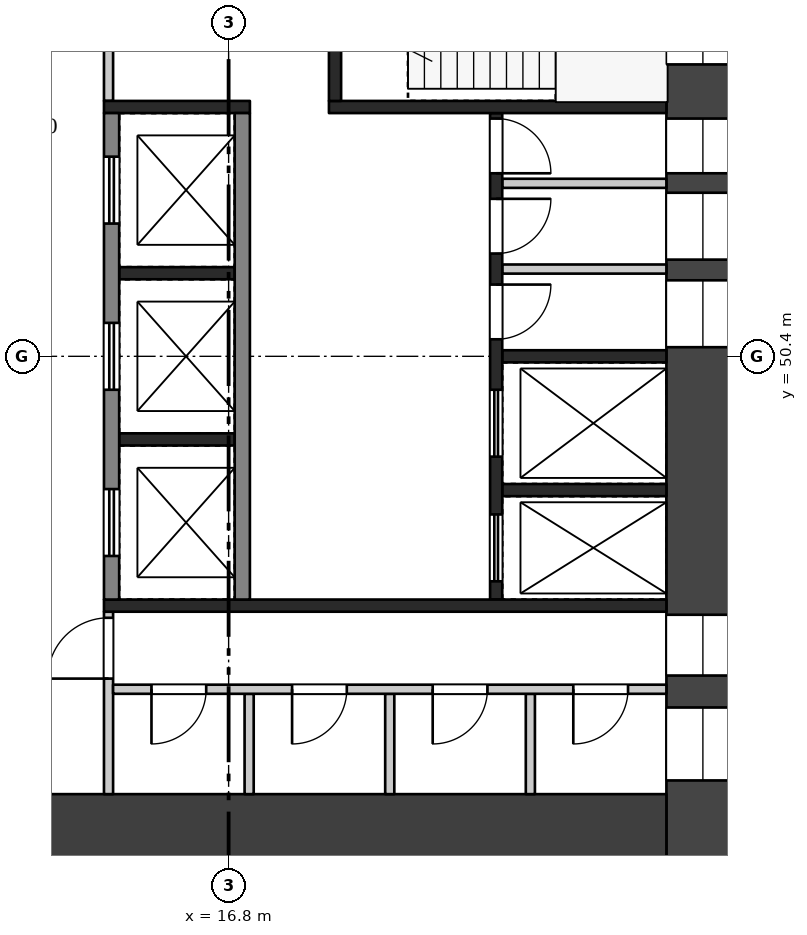
"""IFC4 building model, lengths in metres.
Left out: names, types, materials, properties, quantities, classifications, styles, units other than length and angle.
Written with IfcOpenShell. Run it as: python <this file> out.ifc"""

import sys

from ifc_helpers import new_model, si_unit, direction, frame, frame_2d, origin, place, context, subcontext, project, spatial, rectangle, extrude, element, fill, save


model = new_model("IFC4")
c1 = context("Model", 3, precision=1e-05, world=origin(), true_north=direction((0.0, 1.0)))
c2 = subcontext(c1, "Body", "Model", "MODEL_VIEW")
j1 = project(units=[si_unit("LENGTHUNIT", "METRE"), si_unit("PLANEANGLEUNIT", "RADIAN")], contexts=[c1])
p1 = place(None, origin())
s1 = spatial("IfcSite", under=j1, at=p1, CompositionType="ELEMENT")
p2 = place(p1, origin())
s2 = spatial("IfcBuilding", under=s1, at=p2, CompositionType="ELEMENT")
p3 = place(p2, frame((0.0, 0.0, 158.2)))
s3 = spatial("IfcBuildingStorey", under=s2, at=p3, CompositionType="ELEMENT", Elevation=158.2)
p4 = place(p3, frame((24.6, 58.8, 0.0), z_axis=(0.0, 0.0, 1.0), x_axis=(0.0, -1.0, 0.0)))
e1 = element("IfcWall", 1, at=p4, inside=s3, PredefinedType="SHEAR", context=c2, shape_type="SweptSolid", body=[
    extrude(rectangle(XDim=16.8, YDim=1.2, at=frame_2d((8.4, 0.0))), origin(), (0.0, 0.0, 1.0), 3.22),
])
p5 = place(p4, frame((1.8, 0.0, 0.5)))
e2 = element("IfcOpeningElement", 2, at=p5, cuts=e1, PredefinedType="OPENING", context=c2, shape_type="SweptSolid", body=[
    extrude(rectangle(XDim=1.8, YDim=2.4, at=frame_2d((0.9, 1.2))), frame((0.0, 0.61, 0.0), z_axis=(0.0, -1.0, 0.0), x_axis=(1.0, 0.0, 0.0)), (0.0, 0.0, 1.0), 1.22),
])
p6 = place(p4, frame((4.49, 0.0, 1.6)))
e3 = element("IfcOpeningElement", 3, at=p6, cuts=e1, PredefinedType="OPENING", context=c2, shape_type="SweptSolid", body=[
    extrude(rectangle(XDim=0.9, YDim=1.2, at=frame_2d((0.45, 0.6))), frame((0.0, 0.61, 0.0), z_axis=(0.0, -1.0, 0.0), x_axis=(1.0, 0.0, 0.0)), (0.0, 0.0, 1.0), 1.22),
])
p7 = place(p4, frame((5.71, 0.0, 1.6)))
e4 = element("IfcOpeningElement", 4, at=p7, cuts=e1, PredefinedType="OPENING", context=c2, shape_type="SweptSolid", body=[
    extrude(rectangle(XDim=1.1, YDim=1.2, at=frame_2d((0.55, 0.6))), frame((0.0, 0.61, 0.0), z_axis=(0.0, -1.0, 0.0), x_axis=(1.0, 0.0, 0.0)), (0.0, 0.0, 1.0), 1.22),
])
p8 = place(p4, frame((7.15, 0.0, 1.6)))
e5 = element("IfcOpeningElement", 5, at=p8, cuts=e1, PredefinedType="OPENING", context=c2, shape_type="SweptSolid", body=[
    extrude(rectangle(XDim=1.1, YDim=1.2, at=frame_2d((0.55, 0.6))), frame((0.0, 0.61, 0.0), z_axis=(0.0, -1.0, 0.0), x_axis=(1.0, 0.0, 0.0)), (0.0, 0.0, 1.0), 1.22),
])
p9 = place(p4, frame((12.65, 0.0, 0.6)))
e6 = element("IfcOpeningElement", 6, at=p9, cuts=e1, PredefinedType="OPENING", context=c2, shape_type="SweptSolid", body=[
    extrude(rectangle(XDim=1.0, YDim=2.1, at=frame_2d((0.5, 1.05))), frame((0.0, 0.61, 0.0), z_axis=(0.0, -1.0, 0.0), x_axis=(1.0, 0.0, 0.0)), (0.0, 0.0, 1.0), 1.22),
])
p10 = place(p4, frame((14.175, 0.0, 1.6)))
e7 = element("IfcOpeningElement", 7, at=p10, cuts=e1, PredefinedType="OPENING", context=c2, shape_type="SweptSolid", body=[
    extrude(rectangle(XDim=1.2, YDim=1.2, at=frame_2d((0.6, 0.6))), frame((0.0, 0.61, 0.0), z_axis=(0.0, -1.0, 0.0), x_axis=(1.0, 0.0, 0.0)), (0.0, 0.0, 1.0), 1.22),
])
p11 = place(p3, frame((9.6, 42.6, 0.0), z_axis=(0.0, 0.0, 1.0), x_axis=(1.0, 0.0, 0.0)))
e8 = element("IfcWall", 8, at=p11, inside=s3, PredefinedType="SHEAR", context=c2, shape_type="SweptSolid", body=[
    extrude(rectangle(XDim=14.4, YDim=1.2, at=frame_2d((7.2, 0.0))), origin(), (0.0, 0.0, 1.0), 3.22),
])
p12 = place(p11, frame((2.1, 0.0, 0.0)))
e9 = element("IfcOpeningElement", 9, at=p12, cuts=e8, PredefinedType="OPENING", context=c2, shape_type="SweptSolid", body=[
    extrude(rectangle(XDim=1.8, YDim=2.1, at=frame_2d((0.9, 1.05))), frame((0.0, 0.61, 0.0), z_axis=(0.0, -1.0, 0.0), x_axis=(1.0, 0.0, 0.0)), (0.0, 0.0, 1.0), 1.22),
])
for number, where, z_axis, x_axis in (
    (10, (15.0, 51.767, 0.0), (0.0, 0.0, 1.0), (1.0, 0.0, 0.0)),
    (11, (15.0, 49.033, 0.0), (0.0, 0.0, 1.0), (1.0, 0.0, 0.0)),
):
    element("IfcWall", number, at=place(p3, frame(where, z_axis=z_axis, x_axis=x_axis)), inside=s3, PredefinedType="SHEAR", context=c2, shape_type="SweptSolid", body=[
        extrude(rectangle(XDim=1.9, YDim=0.2, at=frame_2d((0.95, 0.0))), origin(), (0.0, 0.0, 1.0), 3.22),
    ])
p13 = place(p3, frame((14.875, 54.4, 0.0), z_axis=(0.0, 0.0, 1.0), x_axis=(0.0, -1.0, 0.0)))
e12 = element("IfcWall", 12, at=p13, inside=s3, PredefinedType="SHEAR", context=c2, shape_type="SweptSolid", body=[
    extrude(rectangle(XDim=8.0, YDim=0.25, at=frame_2d((4.0, 0.0))), origin(), (0.0, 0.0, 1.0), 3.22),
])
p14 = place(p13, frame((0.717, 0.0, 0.0)))
e13 = element("IfcOpeningElement", 13, at=p14, cuts=e12, PredefinedType="OPENING", context=c2, shape_type="SweptSolid", body=[
    extrude(rectangle(XDim=1.1, YDim=2.1, at=frame_2d((0.55, 1.05))), frame((0.0, 0.135, 0.0), z_axis=(0.0, -1.0, 0.0), x_axis=(1.0, 0.0, 0.0)), (0.0, 0.0, 1.0), 0.27),
])
p15 = place(p13, frame((3.45, 0.0, 0.0)))
e14 = element("IfcOpeningElement", 14, at=p15, cuts=e12, PredefinedType="OPENING", context=c2, shape_type="SweptSolid", body=[
    extrude(rectangle(XDim=1.1, YDim=2.1, at=frame_2d((0.55, 1.05))), frame((0.0, 0.135, 0.0), z_axis=(0.0, -1.0, 0.0), x_axis=(1.0, 0.0, 0.0)), (0.0, 0.0, 1.0), 0.27),
])
p16 = place(p13, frame((6.183, 0.0, 0.0)))
e15 = element("IfcOpeningElement", 15, at=p16, cuts=e12, PredefinedType="OPENING", context=c2, shape_type="SweptSolid", body=[
    extrude(rectangle(XDim=1.1, YDim=2.1, at=frame_2d((0.55, 1.05))), frame((0.0, 0.135, 0.0), z_axis=(0.0, -1.0, 0.0), x_axis=(1.0, 0.0, 0.0)), (0.0, 0.0, 1.0), 0.27),
])
p17 = place(p3, frame((17.025, 54.4, 0.0), z_axis=(0.0, 0.0, 1.0), x_axis=(0.0, -1.0, 0.0)))
e16 = element("IfcWall", 16, at=p17, inside=s3, PredefinedType="SHEAR", context=c2, shape_type="SweptSolid", body=[
    extrude(rectangle(XDim=8.0, YDim=0.25, at=frame_2d((4.0, 0.0))), origin(), (0.0, 0.0, 1.0), 3.22),
])
for number, where, z_axis, x_axis in (
    (17, (21.3, 50.4, 0.0), (0.0, 0.0, 1.0), (1.0, 0.0, 0.0)),
    (18, (21.3, 48.2, 0.0), (0.0, 0.0, 1.0), (1.0, 0.0, 0.0)),
):
    element("IfcWall", number, at=place(p3, frame(where, z_axis=z_axis, x_axis=x_axis)), inside=s3, PredefinedType="SHEAR", context=c2, shape_type="SweptSolid", body=[
        extrude(rectangle(XDim=2.7, YDim=0.2, at=frame_2d((1.35, 0.0))), origin(), (0.0, 0.0, 1.0), 3.22),
    ])
for number, where, z_axis, x_axis in (
    (19, (21.3, 53.245, 0.0), (0.0, 0.0, 1.0), (1.0, 0.0, 0.0)),
    (20, (21.3, 51.835, 0.0), (0.0, 0.0, 1.0), (1.0, 0.0, 0.0)),
):
    element("IfcWall", number, at=place(p3, frame(where, z_axis=z_axis, x_axis=x_axis)), inside=s3, PredefinedType="PARTITIONING", context=c2, shape_type="SweptSolid", body=[
        extrude(rectangle(XDim=2.7, YDim=0.15, at=frame_2d((1.35, 0.0))), origin(), (0.0, 0.0, 1.0), 3.22),
    ])
p18 = place(p3, frame((21.2, 54.4, 0.0), z_axis=(0.0, 0.0, 1.0), x_axis=(0.0, -1.0, 0.0)))
e21 = element("IfcWall", 21, at=p18, inside=s3, PredefinedType="SHEAR", context=c2, shape_type="SweptSolid", body=[
    extrude(rectangle(XDim=8.0, YDim=0.2, at=frame_2d((4.0, 0.0))), origin(), (0.0, 0.0, 1.0), 3.22),
])
p19 = place(p18, frame((0.09, 0.0, 0.0)))
e22 = element("IfcOpeningElement", 22, at=p19, cuts=e21, PredefinedType="OPENING", context=c2, shape_type="SweptSolid", body=[
    extrude(rectangle(XDim=0.9, YDim=2.1, at=frame_2d((0.45, 1.05))), frame((0.0, 0.11, 0.0), z_axis=(0.0, -1.0, 0.0), x_axis=(1.0, 0.0, 0.0)), (0.0, 0.0, 1.0), 0.22),
])
p20 = place(p18, frame((1.41, 0.0, 0.0)))
e23 = element("IfcOpeningElement", 23, at=p20, cuts=e21, PredefinedType="OPENING", context=c2, shape_type="SweptSolid", body=[
    extrude(rectangle(XDim=0.9, YDim=2.1, at=frame_2d((0.45, 1.05))), frame((0.0, 0.11, 0.0), z_axis=(0.0, -1.0, 0.0), x_axis=(1.0, 0.0, 0.0)), (0.0, 0.0, 1.0), 0.22),
])
p21 = place(p18, frame((2.82, 0.0, 0.0)))
e24 = element("IfcOpeningElement", 24, at=p21, cuts=e21, PredefinedType="OPENING", context=c2, shape_type="SweptSolid", body=[
    extrude(rectangle(XDim=0.9, YDim=2.1, at=frame_2d((0.45, 1.05))), frame((0.0, 0.11, 0.0), z_axis=(0.0, -1.0, 0.0), x_axis=(1.0, 0.0, 0.0)), (0.0, 0.0, 1.0), 0.22),
])
p22 = place(p18, frame((4.55, 0.0, 0.0)))
e25 = element("IfcOpeningElement", 25, at=p22, cuts=e21, PredefinedType="OPENING", context=c2, shape_type="SweptSolid", body=[
    extrude(rectangle(XDim=1.1, YDim=2.1, at=frame_2d((0.55, 1.05))), frame((0.0, 0.11, 0.0), z_axis=(0.0, -1.0, 0.0), x_axis=(1.0, 0.0, 0.0)), (0.0, 0.0, 1.0), 0.22),
])
p23 = place(p18, frame((6.6, 0.0, 0.0)))
e26 = element("IfcOpeningElement", 26, at=p23, cuts=e21, PredefinedType="OPENING", context=c2, shape_type="SweptSolid", body=[
    extrude(rectangle(XDim=1.1, YDim=2.1, at=frame_2d((0.55, 1.05))), frame((0.0, 0.11, 0.0), z_axis=(0.0, -1.0, 0.0), x_axis=(1.0, 0.0, 0.0)), (0.0, 0.0, 1.0), 0.22),
])
p24 = place(p3, frame((14.75, 54.5, 0.0), z_axis=(0.0, 0.0, 1.0), x_axis=(1.0, 0.0, 0.0)))
e27 = element("IfcWall", 27, at=p24, inside=s3, PredefinedType="SHEAR", context=c2, shape_type="SweptSolid", body=[
    extrude(rectangle(XDim=2.4, YDim=0.2, at=frame_2d((1.2, 0.0))), origin(), (0.0, 0.0, 1.0), 3.22),
])
p25 = place(p3, frame((18.45, 54.5, 0.0), z_axis=(0.0, 0.0, 1.0), x_axis=(1.0, 0.0, 0.0)))
e28 = element("IfcWall", 28, at=p25, inside=s3, PredefinedType="SHEAR", context=c2, shape_type="SweptSolid", body=[
    extrude(rectangle(XDim=5.55, YDim=0.2, at=frame_2d((2.775, 0.0))), origin(), (0.0, 0.0, 1.0), 3.22),
])
p26 = place(p3, frame((14.825, 57.6, 0.0), z_axis=(0.0, 0.0, 1.0), x_axis=(0.0, -1.0, 0.0)))
e29 = element("IfcWall", 29, at=p26, inside=s3, PredefinedType="PARTITIONING", context=c2, shape_type="SweptSolid", body=[
    extrude(rectangle(XDim=3.0, YDim=0.15, at=frame_2d((1.5, 0.0))), origin(), (0.0, 0.0, 1.0), 3.22),
])
p27 = place(p26, frame((1.0, 0.0, 0.0)))
e30 = element("IfcOpeningElement", 30, at=p27, cuts=e29, PredefinedType="OPENING", context=c2, shape_type="SweptSolid", body=[
    extrude(rectangle(XDim=1.0, YDim=2.1, at=frame_2d((0.5, 1.05))), frame((0.0, 0.085, 0.0), z_axis=(0.0, -1.0, 0.0), x_axis=(1.0, 0.0, 0.0)), (0.0, 0.0, 1.0), 0.17),
])
p28 = place(p3, frame((18.55, 57.6, 0.0), z_axis=(0.0, 0.0, 1.0), x_axis=(0.0, -1.0, 0.0)))
e31 = element("IfcWall", 31, at=p28, inside=s3, PredefinedType="SHEAR", context=c2, shape_type="SweptSolid", body=[
    extrude(rectangle(XDim=3.0, YDim=0.2, at=frame_2d((1.5, 0.0))), origin(), (0.0, 0.0, 1.0), 3.22),
])
p29 = place(p28, frame((1.0, 0.0, 0.0)))
e32 = element("IfcOpeningElement", 32, at=p29, cuts=e31, PredefinedType="OPENING", context=c2, shape_type="SweptSolid", body=[
    extrude(rectangle(XDim=1.0, YDim=2.1, at=frame_2d((0.5, 1.05))), frame((0.0, 0.11, 0.0), z_axis=(0.0, -1.0, 0.0), x_axis=(1.0, 0.0, 0.0)), (0.0, 0.0, 1.0), 0.22),
])
p30 = place(p3, frame((14.75, 46.3, 0.0), z_axis=(0.0, 0.0, 1.0), x_axis=(1.0, 0.0, 0.0)))
e33 = element("IfcWall", 33, at=p30, inside=s3, PredefinedType="SHEAR", context=c2, shape_type="SweptSolid", body=[
    extrude(rectangle(XDim=9.25, YDim=0.2, at=frame_2d((4.625, 0.0))), origin(), (0.0, 0.0, 1.0), 3.22),
])
p31 = place(p3, frame((14.825, 46.2, 0.0), z_axis=(0.0, 0.0, 1.0), x_axis=(0.0, -1.0, 0.0)))
e34 = element("IfcWall", 34, at=p31, inside=s3, PredefinedType="PARTITIONING", context=c2, shape_type="SweptSolid", body=[
    extrude(rectangle(XDim=3.0, YDim=0.15, at=frame_2d((1.5, 0.0))), origin(), (0.0, 0.0, 1.0), 3.22),
])
p32 = place(p31, frame((0.1, 0.0, 0.0)))
e35 = element("IfcOpeningElement", 35, at=p32, cuts=e34, PredefinedType="OPENING", context=c2, shape_type="SweptSolid", body=[
    extrude(rectangle(XDim=1.0, YDim=2.1, at=frame_2d((0.5, 1.05))), frame((0.0, 0.085, 0.0), z_axis=(0.0, -1.0, 0.0), x_axis=(1.0, 0.0, 0.0)), (0.0, 0.0, 1.0), 0.17),
])
for number, where, z_axis, x_axis in (
    (36, (17.137, 44.85, 0.0), (0.0, 0.0, 1.0), (0.0, -1.0, 0.0)),
    (37, (19.45, 44.85, 0.0), (0.0, 0.0, 1.0), (0.0, -1.0, 0.0)),
    (38, (21.762, 44.85, 0.0), (0.0, 0.0, 1.0), (0.0, -1.0, 0.0)),
):
    element("IfcWall", number, at=place(p3, frame(where, z_axis=z_axis, x_axis=x_axis)), inside=s3, PredefinedType="PARTITIONING", context=c2, shape_type="SweptSolid", body=[
        extrude(rectangle(XDim=1.65, YDim=0.15, at=frame_2d((0.825, 0.0))), origin(), (0.0, 0.0, 1.0), 3.22),
    ])
p33 = place(p3, frame((14.9, 44.925, 0.0), z_axis=(0.0, 0.0, 1.0), x_axis=(1.0, 0.0, 0.0)))
e39 = element("IfcWall", 39, at=p33, inside=s3, PredefinedType="PARTITIONING", context=c2, shape_type="SweptSolid", body=[
    extrude(rectangle(XDim=9.1, YDim=0.15, at=frame_2d((4.55, 0.0))), origin(), (0.0, 0.0, 1.0), 3.22),
])
p34 = place(p33, frame((0.631, 0.0, 0.0)))
e40 = element("IfcOpeningElement", 40, at=p34, cuts=e39, PredefinedType="OPENING", context=c2, shape_type="SweptSolid", body=[
    extrude(rectangle(XDim=0.9, YDim=2.1, at=frame_2d((0.45, 1.05))), frame((0.0, 0.085, 0.0), z_axis=(0.0, -1.0, 0.0), x_axis=(1.0, 0.0, 0.0)), (0.0, 0.0, 1.0), 0.17),
])
p35 = place(p33, frame((2.944, 0.0, 0.0)))
e41 = element("IfcOpeningElement", 41, at=p35, cuts=e39, PredefinedType="OPENING", context=c2, shape_type="SweptSolid", body=[
    extrude(rectangle(XDim=0.9, YDim=2.1, at=frame_2d((0.45, 1.05))), frame((0.0, 0.085, 0.0), z_axis=(0.0, -1.0, 0.0), x_axis=(1.0, 0.0, 0.0)), (0.0, 0.0, 1.0), 0.17),
])
p36 = place(p33, frame((5.256, 0.0, 0.0)))
e42 = element("IfcOpeningElement", 42, at=p36, cuts=e39, PredefinedType="OPENING", context=c2, shape_type="SweptSolid", body=[
    extrude(rectangle(XDim=0.9, YDim=2.1, at=frame_2d((0.45, 1.05))), frame((0.0, 0.085, 0.0), z_axis=(0.0, -1.0, 0.0), x_axis=(1.0, 0.0, 0.0)), (0.0, 0.0, 1.0), 0.17),
])
p37 = place(p33, frame((7.569, 0.0, 0.0)))
e43 = element("IfcOpeningElement", 43, at=p37, cuts=e39, PredefinedType="OPENING", context=c2, shape_type="SweptSolid", body=[
    extrude(rectangle(XDim=0.9, YDim=2.1, at=frame_2d((0.45, 1.05))), frame((0.0, 0.085, 0.0), z_axis=(0.0, -1.0, 0.0), x_axis=(1.0, 0.0, 0.0)), (0.0, 0.0, 1.0), 0.17),
])
p38 = place(p14, origin())
e44 = element("IfcDoor", 44, at=p38, inside=s3, OperationType="DOUBLE_DOOR_SLIDING", PredefinedType="DOOR", context=c2, shape_type="SweptSolid", body=[
    extrude(rectangle(XDim=1.1, YDim=2.1, at=frame_2d((0.55, 1.05))), frame((0.0, 0.025, 0.0), z_axis=(0.0, -1.0, 0.0), x_axis=(1.0, 0.0, 0.0)), (0.0, 0.0, 1.0), 0.05),
])
fill(e13, e44)
p39 = place(p15, origin())
e45 = element("IfcDoor", 45, at=p39, inside=s3, OperationType="DOUBLE_DOOR_SLIDING", PredefinedType="DOOR", context=c2, shape_type="SweptSolid", body=[
    extrude(rectangle(XDim=1.1, YDim=2.1, at=frame_2d((0.55, 1.05))), frame((0.0, 0.025, 0.0), z_axis=(0.0, -1.0, 0.0), x_axis=(1.0, 0.0, 0.0)), (0.0, 0.0, 1.0), 0.05),
])
fill(e14, e45)
p40 = place(p16, origin())
e46 = element("IfcDoor", 46, at=p40, inside=s3, OperationType="DOUBLE_DOOR_SLIDING", PredefinedType="DOOR", context=c2, shape_type="SweptSolid", body=[
    extrude(rectangle(XDim=1.1, YDim=2.1, at=frame_2d((0.55, 1.05))), frame((0.0, 0.025, 0.0), z_axis=(0.0, -1.0, 0.0), x_axis=(1.0, 0.0, 0.0)), (0.0, 0.0, 1.0), 0.05),
])
fill(e15, e46)
p41 = place(p19, origin())
e47 = element("IfcDoor", 47, at=p41, inside=s3, OperationType="SINGLE_SWING_RIGHT", PredefinedType="DOOR", context=c2, shape_type="SweptSolid", body=[
    extrude(rectangle(XDim=0.9, YDim=2.1, at=frame_2d((0.45, 1.05))), frame((0.0, 0.025, 0.0), z_axis=(0.0, -1.0, 0.0), x_axis=(1.0, 0.0, 0.0)), (0.0, 0.0, 1.0), 0.05),
])
fill(e22, e47)
p42 = place(p20, origin())
e48 = element("IfcDoor", 48, at=p42, inside=s3, OperationType="SINGLE_SWING_LEFT", PredefinedType="DOOR", context=c2, shape_type="SweptSolid", body=[
    extrude(rectangle(XDim=0.9, YDim=2.1, at=frame_2d((0.45, 1.05))), frame((0.0, 0.025, 0.0), z_axis=(0.0, -1.0, 0.0), x_axis=(1.0, 0.0, 0.0)), (0.0, 0.0, 1.0), 0.05),
])
fill(e23, e48)
p43 = place(p21, origin())
e49 = element("IfcDoor", 49, at=p43, inside=s3, OperationType="SINGLE_SWING_LEFT", PredefinedType="DOOR", context=c2, shape_type="SweptSolid", body=[
    extrude(rectangle(XDim=0.9, YDim=2.1, at=frame_2d((0.45, 1.05))), frame((0.0, 0.025, 0.0), z_axis=(0.0, -1.0, 0.0), x_axis=(1.0, 0.0, 0.0)), (0.0, 0.0, 1.0), 0.05),
])
fill(e24, e49)
p44 = place(p22, origin())
e50 = element("IfcDoor", 50, at=p44, inside=s3, OperationType="DOUBLE_DOOR_SLIDING", PredefinedType="DOOR", context=c2, shape_type="SweptSolid", body=[
    extrude(rectangle(XDim=1.1, YDim=2.1, at=frame_2d((0.55, 1.05))), frame((0.0, 0.025, 0.0), z_axis=(0.0, -1.0, 0.0), x_axis=(1.0, 0.0, 0.0)), (0.0, 0.0, 1.0), 0.05),
])
fill(e25, e50)
p45 = place(p23, origin())
e51 = element("IfcDoor", 51, at=p45, inside=s3, OperationType="DOUBLE_DOOR_SLIDING", PredefinedType="DOOR", context=c2, shape_type="SweptSolid", body=[
    extrude(rectangle(XDim=1.1, YDim=2.1, at=frame_2d((0.55, 1.05))), frame((0.0, 0.025, 0.0), z_axis=(0.0, -1.0, 0.0), x_axis=(1.0, 0.0, 0.0)), (0.0, 0.0, 1.0), 0.05),
])
fill(e26, e51)
p46 = place(p32, frame((1.0, 0.0, 0.0), z_axis=(0.0, 0.0, 1.0), x_axis=(-1.0, 0.0, 0.0)))
e52 = element("IfcDoor", 52, at=p46, inside=s3, OperationType="SINGLE_SWING_LEFT", PredefinedType="DOOR", context=c2, shape_type="SweptSolid", body=[
    extrude(rectangle(XDim=1.0, YDim=2.1, at=frame_2d((0.5, 1.05))), frame((0.0, 0.025, 0.0), z_axis=(0.0, -1.0, 0.0), x_axis=(1.0, 0.0, 0.0)), (0.0, 0.0, 1.0), 0.05),
])
fill(e35, e52)
p47 = place(p34, frame((0.9, 0.0, 0.0), z_axis=(0.0, 0.0, 1.0), x_axis=(-1.0, 0.0, 0.0)))
e53 = element("IfcDoor", 53, at=p47, inside=s3, OperationType="SINGLE_SWING_RIGHT", PredefinedType="DOOR", context=c2, shape_type="SweptSolid", body=[
    extrude(rectangle(XDim=0.9, YDim=2.1, at=frame_2d((0.45, 1.05))), frame((0.0, 0.025, 0.0), z_axis=(0.0, -1.0, 0.0), x_axis=(1.0, 0.0, 0.0)), (0.0, 0.0, 1.0), 0.05),
])
fill(e40, e53)
p48 = place(p35, frame((0.9, 0.0, 0.0), z_axis=(0.0, 0.0, 1.0), x_axis=(-1.0, 0.0, 0.0)))
e54 = element("IfcDoor", 54, at=p48, inside=s3, OperationType="SINGLE_SWING_RIGHT", PredefinedType="DOOR", context=c2, shape_type="SweptSolid", body=[
    extrude(rectangle(XDim=0.9, YDim=2.1, at=frame_2d((0.45, 1.05))), frame((0.0, 0.025, 0.0), z_axis=(0.0, -1.0, 0.0), x_axis=(1.0, 0.0, 0.0)), (0.0, 0.0, 1.0), 0.05),
])
fill(e41, e54)
p49 = place(p36, frame((0.9, 0.0, 0.0), z_axis=(0.0, 0.0, 1.0), x_axis=(-1.0, 0.0, 0.0)))
e55 = element("IfcDoor", 55, at=p49, inside=s3, OperationType="SINGLE_SWING_RIGHT", PredefinedType="DOOR", context=c2, shape_type="SweptSolid", body=[
    extrude(rectangle(XDim=0.9, YDim=2.1, at=frame_2d((0.45, 1.05))), frame((0.0, 0.025, 0.0), z_axis=(0.0, -1.0, 0.0), x_axis=(1.0, 0.0, 0.0)), (0.0, 0.0, 1.0), 0.05),
])
fill(e42, e55)
p50 = place(p37, frame((0.9, 0.0, 0.0), z_axis=(0.0, 0.0, 1.0), x_axis=(-1.0, 0.0, 0.0)))
e56 = element("IfcDoor", 56, at=p50, inside=s3, OperationType="SINGLE_SWING_RIGHT", PredefinedType="DOOR", context=c2, shape_type="SweptSolid", body=[
    extrude(rectangle(XDim=0.9, YDim=2.1, at=frame_2d((0.45, 1.05))), frame((0.0, 0.025, 0.0), z_axis=(0.0, -1.0, 0.0), x_axis=(1.0, 0.0, 0.0)), (0.0, 0.0, 1.0), 0.05),
])
fill(e43, e56)
p51 = place(p5, origin())
e57 = element("IfcWindow", 57, at=p51, inside=s3, PartitioningType="SINGLE_PANEL", PredefinedType="WINDOW", context=c2, shape_type="SweptSolid", body=[
    extrude(rectangle(XDim=1.8, YDim=2.4, at=frame_2d((0.9, 1.2))), frame((0.0, 0.03, 0.0), z_axis=(0.0, -1.0, 0.0), x_axis=(1.0, 0.0, 0.0)), (0.0, 0.0, 1.0), 0.06),
])
fill(e2, e57)
p52 = place(p6, origin())
e58 = element("IfcWindow", 58, at=p52, inside=s3, PartitioningType="SINGLE_PANEL", PredefinedType="WINDOW", context=c2, shape_type="SweptSolid", body=[
    extrude(rectangle(XDim=0.9, YDim=1.2, at=frame_2d((0.45, 0.6))), frame((0.0, 0.03, 0.0), z_axis=(0.0, -1.0, 0.0), x_axis=(1.0, 0.0, 0.0)), (0.0, 0.0, 1.0), 0.06),
])
fill(e3, e58)
p53 = place(p7, origin())
e59 = element("IfcWindow", 59, at=p53, inside=s3, PartitioningType="SINGLE_PANEL", PredefinedType="WINDOW", context=c2, shape_type="SweptSolid", body=[
    extrude(rectangle(XDim=1.1, YDim=1.2, at=frame_2d((0.55, 0.6))), frame((0.0, 0.03, 0.0), z_axis=(0.0, -1.0, 0.0), x_axis=(1.0, 0.0, 0.0)), (0.0, 0.0, 1.0), 0.06),
])
fill(e4, e59)
p54 = place(p8, origin())
e60 = element("IfcWindow", 60, at=p54, inside=s3, PartitioningType="SINGLE_PANEL", PredefinedType="WINDOW", context=c2, shape_type="SweptSolid", body=[
    extrude(rectangle(XDim=1.1, YDim=1.2, at=frame_2d((0.55, 0.6))), frame((0.0, 0.03, 0.0), z_axis=(0.0, -1.0, 0.0), x_axis=(1.0, 0.0, 0.0)), (0.0, 0.0, 1.0), 0.06),
])
fill(e5, e60)
p55 = place(p9, origin())
e61 = element("IfcWindow", 61, at=p55, inside=s3, PartitioningType="SINGLE_PANEL", PredefinedType="WINDOW", context=c2, shape_type="SweptSolid", body=[
    extrude(rectangle(XDim=1.0, YDim=2.1, at=frame_2d((0.5, 1.05))), frame((0.0, 0.03, 0.0), z_axis=(0.0, -1.0, 0.0), x_axis=(1.0, 0.0, 0.0)), (0.0, 0.0, 1.0), 0.06),
])
fill(e6, e61)
p56 = place(p10, origin())
e62 = element("IfcWindow", 62, at=p56, inside=s3, PartitioningType="SINGLE_PANEL", PredefinedType="WINDOW", context=c2, shape_type="SweptSolid", body=[
    extrude(rectangle(XDim=1.2, YDim=1.2, at=frame_2d((0.6, 0.6))), frame((0.0, 0.03, 0.0), z_axis=(0.0, -1.0, 0.0), x_axis=(1.0, 0.0, 0.0)), (0.0, 0.0, 1.0), 0.06),
])
fill(e7, e62)
save(model, sys.argv[1])
